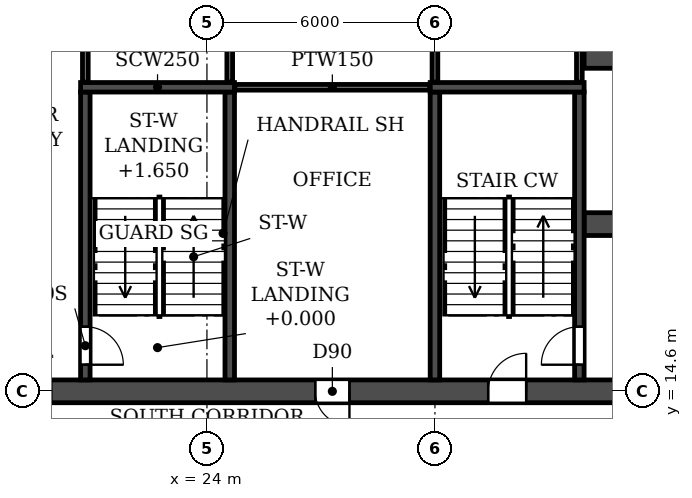
"""IFC4 building model, lengths in metres.
Left out: names, types, materials, properties, quantities, classifications, styles, units other than length and angle.
Written with IfcOpenShell. Run it as: python <this file> out.ifc"""

import sys

from ifc_helpers import new_model, si_unit, direction, frame, frame_2d, origin, place, context, subcontext, project, spatial, rectangle, extrude, element, fill, save


model = new_model("IFC4")
c1 = context("Model", 3, precision=1e-05, world=origin(), true_north=direction((0.0, 1.0)))
c2 = subcontext(c1, "Body", "Model", "MODEL_VIEW")
j1 = project(units=[si_unit("LENGTHUNIT", "METRE"), si_unit("PLANEANGLEUNIT", "RADIAN")], contexts=[c1])
p1 = place(None, origin())
s1 = spatial("IfcSite", under=j1, at=p1, CompositionType="ELEMENT")
p2 = place(p1, origin())
s2 = spatial("IfcBuilding", under=s1, at=p2, CompositionType="ELEMENT")
p3 = place(p2, frame((0.0, 0.0, 53.1)))
s3 = spatial("IfcBuildingStorey", under=s2, at=p3, CompositionType="ELEMENT", Elevation=53.1)
p4 = place(p3, frame((8.6, 14.6, 0.0), z_axis=(0.0, 0.0, 1.0), x_axis=(1.0, 0.0, 0.0)))
e1 = element("IfcWall", 1, at=p4, inside=s3, PredefinedType="SOLIDWALL", context=c2, shape_type="SweptSolid", body=[
    extrude(rectangle(XDim=84.8, YDim=0.6, at=frame_2d((42.4, 0.0))), origin(), (0.0, 0.0, 1.0), 3.05),
])
p5 = place(p4, frame((6.6, 0.0, 0.0)))
e2 = element("IfcOpeningElement", 2, at=p5, cuts=e1, PredefinedType="OPENING", context=c2, shape_type="SweptSolid", body=[
    extrude(rectangle(XDim=0.9, YDim=2.1, at=frame_2d((0.45, 1.05))), frame((0.0, 0.31, 0.0), z_axis=(0.0, -1.0, 0.0), x_axis=(1.0, 0.0, 0.0)), (0.0, 0.0, 1.0), 0.62),
])
p6 = place(p4, frame((10.3, 0.0, 0.0)))
e3 = element("IfcOpeningElement", 3, at=p6, cuts=e1, PredefinedType="OPENING", context=c2, shape_type="SweptSolid", body=[
    extrude(rectangle(XDim=1.0, YDim=2.1, at=frame_2d((0.5, 1.05))), frame((0.0, 0.31, 0.0), z_axis=(0.0, -1.0, 0.0), x_axis=(1.0, 0.0, 0.0)), (0.0, 0.0, 1.0), 0.62),
])
p7 = place(p4, frame((18.25, 0.0, 0.0)))
e4 = element("IfcOpeningElement", 4, at=p7, cuts=e1, PredefinedType="OPENING", context=c2, shape_type="SweptSolid", body=[
    extrude(rectangle(XDim=0.9, YDim=2.1, at=frame_2d((0.45, 1.05))), frame((0.0, 0.31, 0.0), z_axis=(0.0, -1.0, 0.0), x_axis=(1.0, 0.0, 0.0)), (0.0, 0.0, 1.0), 0.62),
])
p8 = place(p4, frame((22.8, 0.0, 0.0)))
e5 = element("IfcOpeningElement", 5, at=p8, cuts=e1, PredefinedType="OPENING", context=c2, shape_type="SweptSolid", body=[
    extrude(rectangle(XDim=1.0, YDim=2.1, at=frame_2d((0.5, 1.05))), frame((0.0, 0.31, 0.0), z_axis=(0.0, -1.0, 0.0), x_axis=(1.0, 0.0, 0.0)), (0.0, 0.0, 1.0), 0.62),
])
p9 = place(p4, frame((34.1, 0.0, 0.0)))
e6 = element("IfcOpeningElement", 6, at=p9, cuts=e1, PredefinedType="OPENING", context=c2, shape_type="SweptSolid", body=[
    extrude(rectangle(XDim=1.0, YDim=2.1, at=frame_2d((0.5, 1.05))), frame((0.0, 0.31, 0.0), z_axis=(0.0, -1.0, 0.0), x_axis=(1.0, 0.0, 0.0)), (0.0, 0.0, 1.0), 0.62),
])
p10 = place(p4, frame((38.0, 0.0, 0.0)))
e7 = element("IfcOpeningElement", 7, at=p10, cuts=e1, PredefinedType="OPENING", context=c2, shape_type="SweptSolid", body=[
    extrude(rectangle(XDim=1.0, YDim=2.1, at=frame_2d((0.5, 1.05))), frame((0.0, 0.31, 0.0), z_axis=(0.0, -1.0, 0.0), x_axis=(1.0, 0.0, 0.0)), (0.0, 0.0, 1.0), 0.62),
])
p11 = place(p4, frame((41.9, 0.0, 0.0)))
e8 = element("IfcOpeningElement", 8, at=p11, cuts=e1, PredefinedType="OPENING", context=c2, shape_type="SweptSolid", body=[
    extrude(rectangle(XDim=1.0, YDim=2.1, at=frame_2d((0.5, 1.05))), frame((0.0, 0.31, 0.0), z_axis=(0.0, -1.0, 0.0), x_axis=(1.0, 0.0, 0.0)), (0.0, 0.0, 1.0), 0.62),
])
p12 = place(p4, frame((45.8, 0.0, 0.0)))
e9 = element("IfcOpeningElement", 9, at=p12, cuts=e1, PredefinedType="OPENING", context=c2, shape_type="SweptSolid", body=[
    extrude(rectangle(XDim=1.0, YDim=2.1, at=frame_2d((0.5, 1.05))), frame((0.0, 0.31, 0.0), z_axis=(0.0, -1.0, 0.0), x_axis=(1.0, 0.0, 0.0)), (0.0, 0.0, 1.0), 0.62),
])
p13 = place(p4, frame((49.7, 0.0, 0.0)))
e10 = element("IfcOpeningElement", 10, at=p13, cuts=e1, PredefinedType="OPENING", context=c2, shape_type="SweptSolid", body=[
    extrude(rectangle(XDim=1.0, YDim=2.1, at=frame_2d((0.5, 1.05))), frame((0.0, 0.31, 0.0), z_axis=(0.0, -1.0, 0.0), x_axis=(1.0, 0.0, 0.0)), (0.0, 0.0, 1.0), 0.62),
])
p14 = place(p4, frame((61.0, 0.0, 0.0)))
e11 = element("IfcOpeningElement", 11, at=p14, cuts=e1, PredefinedType="OPENING", context=c2, shape_type="SweptSolid", body=[
    extrude(rectangle(XDim=1.0, YDim=2.1, at=frame_2d((0.5, 1.05))), frame((0.0, 0.31, 0.0), z_axis=(0.0, -1.0, 0.0), x_axis=(1.0, 0.0, 0.0)), (0.0, 0.0, 1.0), 0.62),
])
p15 = place(p4, frame((65.65, 0.0, 0.0)))
e12 = element("IfcOpeningElement", 12, at=p15, cuts=e1, PredefinedType="OPENING", context=c2, shape_type="SweptSolid", body=[
    extrude(rectangle(XDim=0.9, YDim=2.1, at=frame_2d((0.45, 1.05))), frame((0.0, 0.31, 0.0), z_axis=(0.0, -1.0, 0.0), x_axis=(1.0, 0.0, 0.0)), (0.0, 0.0, 1.0), 0.62),
])
p16 = place(p4, frame((73.5, 0.0, 0.0)))
e13 = element("IfcOpeningElement", 13, at=p16, cuts=e1, PredefinedType="OPENING", context=c2, shape_type="SweptSolid", body=[
    extrude(rectangle(XDim=1.0, YDim=2.1, at=frame_2d((0.5, 1.05))), frame((0.0, 0.31, 0.0), z_axis=(0.0, -1.0, 0.0), x_axis=(1.0, 0.0, 0.0)), (0.0, 0.0, 1.0), 0.62),
])
p17 = place(p4, frame((77.3, 0.0, 0.0)))
e14 = element("IfcOpeningElement", 14, at=p17, cuts=e1, PredefinedType="OPENING", context=c2, shape_type="SweptSolid", body=[
    extrude(rectangle(XDim=0.9, YDim=2.1, at=frame_2d((0.45, 1.05))), frame((0.0, 0.31, 0.0), z_axis=(0.0, -1.0, 0.0), x_axis=(1.0, 0.0, 0.0)), (0.0, 0.0, 1.0), 0.62),
])
p18 = place(p3, frame((33.925, 19.0, 0.0), z_axis=(0.0, 0.0, 1.0), x_axis=(1.0, 0.0, 0.0)))
e15 = element("IfcWall", 15, at=p18, inside=s3, PredefinedType="SOLIDWALL", context=c2, shape_type="SweptSolid", body=[
    extrude(rectangle(XDim=34.15, YDim=0.6, at=frame_2d((17.075, 0.0))), origin(), (0.0, 0.0, 1.0), 3.05),
])
p19 = place(p18, frame((16.175, 0.0, 0.0)))
e16 = element("IfcOpeningElement", 16, at=p19, cuts=e15, PredefinedType="OPENING", context=c2, shape_type="SweptSolid", body=[
    extrude(rectangle(XDim=1.8, YDim=2.1, at=frame_2d((0.9, 1.05))), frame((0.0, 0.31, 0.0), z_axis=(0.0, -1.0, 0.0), x_axis=(1.0, 0.0, 0.0)), (0.0, 0.0, 1.0), 0.62),
])
p20 = place(p18, frame((1.525, 0.0, 0.0)))
e17 = element("IfcOpeningElement", 17, at=p20, cuts=e15, PredefinedType="OPENING", context=c2, shape_type="SweptSolid", body=[
    extrude(rectangle(XDim=1.8, YDim=2.1, at=frame_2d((0.9, 1.05))), frame((0.0, 0.31, 0.0), z_axis=(0.0, -1.0, 0.0), x_axis=(1.0, 0.0, 0.0)), (0.0, 0.0, 1.0), 0.62),
])
p21 = place(p18, frame((8.725, 0.0, 0.0)))
e18 = element("IfcOpeningElement", 18, at=p21, cuts=e15, PredefinedType="OPENING", context=c2, shape_type="SweptSolid", body=[
    extrude(rectangle(XDim=1.1, YDim=2.1, at=frame_2d((0.55, 1.05))), frame((0.0, 0.31, 0.0), z_axis=(0.0, -1.0, 0.0), x_axis=(1.0, 0.0, 0.0)), (0.0, 0.0, 1.0), 0.62),
])
p22 = place(p18, frame((11.325, 0.0, 0.0)))
e19 = element("IfcOpeningElement", 19, at=p22, cuts=e15, PredefinedType="OPENING", context=c2, shape_type="SweptSolid", body=[
    extrude(rectangle(XDim=1.1, YDim=2.1, at=frame_2d((0.55, 1.05))), frame((0.0, 0.31, 0.0), z_axis=(0.0, -1.0, 0.0), x_axis=(1.0, 0.0, 0.0)), (0.0, 0.0, 1.0), 0.62),
])
p23 = place(p18, frame((13.925, 0.0, 0.0)))
e20 = element("IfcOpeningElement", 20, at=p23, cuts=e15, PredefinedType="OPENING", context=c2, shape_type="SweptSolid", body=[
    extrude(rectangle(XDim=1.1, YDim=2.1, at=frame_2d((0.55, 1.05))), frame((0.0, 0.31, 0.0), z_axis=(0.0, -1.0, 0.0), x_axis=(1.0, 0.0, 0.0)), (0.0, 0.0, 1.0), 0.62),
])
p24 = place(p18, frame((19.125, 0.0, 0.0)))
e21 = element("IfcOpeningElement", 21, at=p24, cuts=e15, PredefinedType="OPENING", context=c2, shape_type="SweptSolid", body=[
    extrude(rectangle(XDim=1.1, YDim=2.1, at=frame_2d((0.55, 1.05))), frame((0.0, 0.31, 0.0), z_axis=(0.0, -1.0, 0.0), x_axis=(1.0, 0.0, 0.0)), (0.0, 0.0, 1.0), 0.62),
])
p25 = place(p18, frame((21.725, 0.0, 0.0)))
e22 = element("IfcOpeningElement", 22, at=p25, cuts=e15, PredefinedType="OPENING", context=c2, shape_type="SweptSolid", body=[
    extrude(rectangle(XDim=1.1, YDim=2.1, at=frame_2d((0.55, 1.05))), frame((0.0, 0.31, 0.0), z_axis=(0.0, -1.0, 0.0), x_axis=(1.0, 0.0, 0.0)), (0.0, 0.0, 1.0), 0.62),
])
p26 = place(p18, frame((24.325, 0.0, 0.0)))
e23 = element("IfcOpeningElement", 23, at=p26, cuts=e15, PredefinedType="OPENING", context=c2, shape_type="SweptSolid", body=[
    extrude(rectangle(XDim=1.1, YDim=2.1, at=frame_2d((0.55, 1.05))), frame((0.0, 0.31, 0.0), z_axis=(0.0, -1.0, 0.0), x_axis=(1.0, 0.0, 0.0)), (0.0, 0.0, 1.0), 0.62),
])
p27 = place(p18, frame((30.825, 0.0, 0.0)))
e24 = element("IfcOpeningElement", 24, at=p27, cuts=e15, PredefinedType="OPENING", context=c2, shape_type="SweptSolid", body=[
    extrude(rectangle(XDim=1.8, YDim=2.1, at=frame_2d((0.9, 1.05))), frame((0.0, 0.31, 0.0), z_axis=(0.0, -1.0, 0.0), x_axis=(1.0, 0.0, 0.0)), (0.0, 0.0, 1.0), 0.62),
])
p28 = place(p3, frame((33.925, 23.4, 0.0), z_axis=(0.0, 0.0, 1.0), x_axis=(1.0, 0.0, 0.0)))
e25 = element("IfcWall", 25, at=p28, inside=s3, PredefinedType="SOLIDWALL", context=c2, shape_type="SweptSolid", body=[
    extrude(rectangle(XDim=34.15, YDim=0.6, at=frame_2d((17.075, 0.0))), origin(), (0.0, 0.0, 1.0), 3.05),
])
p29 = place(p28, frame((16.175, 0.0, 0.0)))
e26 = element("IfcOpeningElement", 26, at=p29, cuts=e25, PredefinedType="OPENING", context=c2, shape_type="SweptSolid", body=[
    extrude(rectangle(XDim=1.8, YDim=2.1, at=frame_2d((0.9, 1.05))), frame((0.0, 0.31, 0.0), z_axis=(0.0, -1.0, 0.0), x_axis=(1.0, 0.0, 0.0)), (0.0, 0.0, 1.0), 0.62),
])
p30 = place(p28, frame((11.025, 0.0, 0.0)))
e27 = element("IfcOpeningElement", 27, at=p30, cuts=e25, PredefinedType="OPENING", context=c2, shape_type="SweptSolid", body=[
    extrude(rectangle(XDim=1.1, YDim=2.1, at=frame_2d((0.55, 1.05))), frame((0.0, 0.31, 0.0), z_axis=(0.0, -1.0, 0.0), x_axis=(1.0, 0.0, 0.0)), (0.0, 0.0, 1.0), 0.62),
])
p31 = place(p3, frame((30.0, 14.9, 0.0), z_axis=(0.0, 0.0, 1.0), x_axis=(0.0, 1.0, 0.0)))
e28 = element("IfcWall", 28, at=p31, inside=s3, PredefinedType="SOLIDWALL", context=c2, shape_type="SweptSolid", body=[
    extrude(rectangle(XDim=7.575, YDim=0.25, at=frame_2d((3.788, 0.0))), origin(), (0.0, 0.0, 1.0), 3.05),
])
p32 = place(p3, frame((33.8, 14.9, 0.0), z_axis=(0.0, 0.0, 1.0), x_axis=(0.0, 1.0, 0.0)))
e29 = element("IfcWall", 29, at=p32, inside=s3, PredefinedType="SOLIDWALL", context=c2, shape_type="SweptSolid", body=[
    extrude(rectangle(XDim=7.575, YDim=0.25, at=frame_2d((3.788, 0.0))), origin(), (0.0, 0.0, 1.0), 3.05),
])
p33 = place(p32, frame((0.4, 0.0, 0.0)))
e30 = element("IfcOpeningElement", 30, at=p33, cuts=e29, PredefinedType="OPENING", context=c2, shape_type="SweptSolid", body=[
    extrude(rectangle(XDim=1.0, YDim=2.1, at=frame_2d((0.5, 1.05))), frame((0.0, 0.135, 0.0), z_axis=(0.0, -1.0, 0.0), x_axis=(1.0, 0.0, 0.0)), (0.0, 0.0, 1.0), 0.27),
])
p34 = place(p3, frame((29.875, 22.6, 0.0), z_axis=(0.0, 0.0, 1.0), x_axis=(1.0, 0.0, 0.0)))
e31 = element("IfcWall", 31, at=p34, inside=s3, PredefinedType="SOLIDWALL", context=c2, shape_type="SweptSolid", body=[
    extrude(rectangle(XDim=4.05, YDim=0.25, at=frame_2d((2.025, 0.0))), origin(), (0.0, 0.0, 1.0), 3.05),
])
p35 = place(p3, frame((20.8, 14.9, 0.0), z_axis=(0.0, 0.0, 1.0), x_axis=(0.0, 1.0, 0.0)))
e32 = element("IfcWall", 32, at=p35, inside=s3, PredefinedType="SOLIDWALL", context=c2, shape_type="SweptSolid", body=[
    extrude(rectangle(XDim=7.575, YDim=0.25, at=frame_2d((3.788, 0.0))), origin(), (0.0, 0.0, 1.0), 3.05),
])
p36 = place(p35, frame((0.4, 0.0, 0.0)))
e33 = element("IfcOpeningElement", 33, at=p36, cuts=e32, PredefinedType="OPENING", context=c2, shape_type="SweptSolid", body=[
    extrude(rectangle(XDim=1.0, YDim=2.1, at=frame_2d((0.5, 1.05))), frame((0.0, 0.135, 0.0), z_axis=(0.0, -1.0, 0.0), x_axis=(1.0, 0.0, 0.0)), (0.0, 0.0, 1.0), 0.27),
])
p37 = place(p3, frame((24.6, 14.9, 0.0), z_axis=(0.0, 0.0, 1.0), x_axis=(0.0, 1.0, 0.0)))
e34 = element("IfcWall", 34, at=p37, inside=s3, PredefinedType="SOLIDWALL", context=c2, shape_type="SweptSolid", body=[
    extrude(rectangle(XDim=7.575, YDim=0.25, at=frame_2d((3.788, 0.0))), origin(), (0.0, 0.0, 1.0), 3.05),
])
p38 = place(p3, frame((20.675, 22.6, 0.0), z_axis=(0.0, 0.0, 1.0), x_axis=(1.0, 0.0, 0.0)))
e35 = element("IfcWall", 35, at=p38, inside=s3, PredefinedType="SOLIDWALL", context=c2, shape_type="SweptSolid", body=[
    extrude(rectangle(XDim=4.05, YDim=0.25, at=frame_2d((2.025, 0.0))), origin(), (0.0, 0.0, 1.0), 3.05),
])
p39 = place(p3, frame((24.735, 22.6, 0.0), z_axis=(0.0, 0.0, 1.0), x_axis=(1.0, 0.0, 0.0)))
e36 = element("IfcWall", 36, at=p39, inside=s3, PredefinedType="PARTITIONING", context=c2, shape_type="SweptSolid", body=[
    extrude(rectangle(XDim=5.13, YDim=0.15, at=frame_2d((2.565, 0.0))), origin(), (0.0, 0.0, 1.0), 3.05),
])
for number, where, z_axis, x_axis in (
    (37, (20.8, 22.735, 0.0), (0.0, 0.0, 1.0), (0.0, 1.0, 0.0)),
    (38, (24.6, 22.735, 0.0), (0.0, 0.0, 1.0), (0.0, 1.0, 0.0)),
    (39, (30.0, 22.735, 0.0), (0.0, 0.0, 1.0), (0.0, 1.0, 0.0)),
    (40, (33.8, 22.735, 0.0), (0.0, 0.0, 1.0), (0.0, 1.0, 0.0)),
):
    element("IfcWall", number, at=place(p3, frame(where, z_axis=z_axis, x_axis=x_axis)), inside=s3, PredefinedType="PARTITIONING", context=c2, shape_type="SweptSolid", body=[
        extrude(rectangle(XDim=4.755, YDim=0.15, at=frame_2d((2.377, 0.0))), origin(), (0.0, 0.0, 1.0), 3.05),
    ])
p40 = place(p7, frame((0.9, 0.0, 0.0), z_axis=(0.0, 0.0, 1.0), x_axis=(-1.0, 0.0, 0.0)))
e41 = element("IfcDoor", 41, at=p40, inside=s3, OperationType="SINGLE_SWING_LEFT", PredefinedType="DOOR", context=c2, shape_type="SweptSolid", body=[
    extrude(rectangle(XDim=0.9, YDim=2.1, at=frame_2d((0.45, 1.05))), frame((0.0, 0.025, 0.0), z_axis=(0.0, -1.0, 0.0), x_axis=(1.0, 0.0, 0.0)), (0.0, 0.0, 1.0), 0.05),
])
fill(e4, e41)
p41 = place(p8, origin())
e42 = element("IfcDoor", 42, at=p41, inside=s3, OperationType="SINGLE_SWING_RIGHT", PredefinedType="DOOR", context=c2, shape_type="SweptSolid", body=[
    extrude(rectangle(XDim=1.0, YDim=2.1, at=frame_2d((0.5, 1.05))), frame((0.0, 0.025, 0.0), z_axis=(0.0, -1.0, 0.0), x_axis=(1.0, 0.0, 0.0)), (0.0, 0.0, 1.0), 0.05),
])
fill(e5, e42)
p42 = place(p33, origin())
e43 = element("IfcDoor", 43, at=p42, inside=s3, OperationType="SINGLE_SWING_LEFT", PredefinedType="DOOR", context=c2, shape_type="SweptSolid", body=[
    extrude(rectangle(XDim=1.0, YDim=2.1, at=frame_2d((0.5, 1.05))), frame((0.0, 0.025, 0.0), z_axis=(0.0, -1.0, 0.0), x_axis=(1.0, 0.0, 0.0)), (0.0, 0.0, 1.0), 0.05),
])
fill(e30, e43)
p43 = place(p36, frame((1.0, 0.0, 0.0), z_axis=(0.0, 0.0, 1.0), x_axis=(-1.0, 0.0, 0.0)))
e44 = element("IfcDoor", 44, at=p43, inside=s3, OperationType="SINGLE_SWING_RIGHT", PredefinedType="DOOR", context=c2, shape_type="SweptSolid", body=[
    extrude(rectangle(XDim=1.0, YDim=2.1, at=frame_2d((0.5, 1.05))), frame((0.0, 0.025, 0.0), z_axis=(0.0, -1.0, 0.0), x_axis=(1.0, 0.0, 0.0)), (0.0, 0.0, 1.0), 0.05),
])
fill(e33, e44)
save(model, sys.argv[1])
